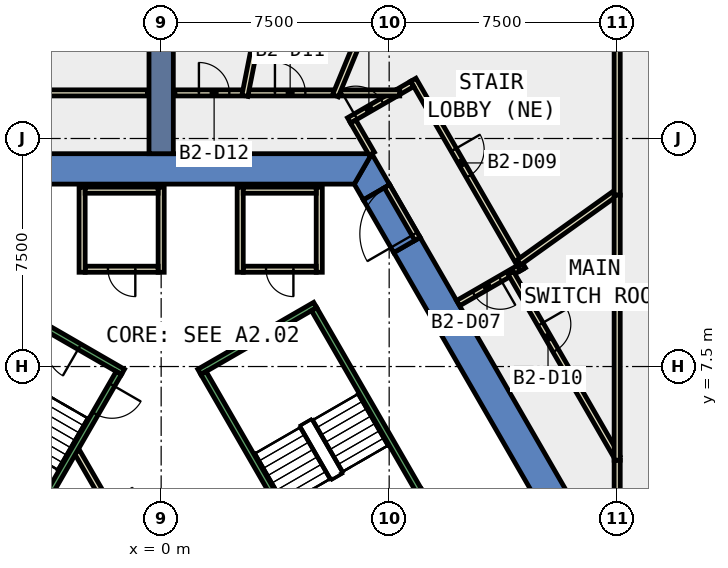
"""IFC4 building model, lengths in metres.
Left out: names, types, materials, properties, quantities, classifications, styles, units other than length and angle.
Written with IfcOpenShell. Run it as: python <this file> out.ifc"""

import sys

from ifc_helpers import new_model, si_unit, direction, frame, frame_2d, origin, place, context, subcontext, project, spatial, polyline, rectangle, outline, extrude, element, fill, save


model = new_model("IFC4")
c1 = context("Model", 3, precision=1e-05, world=origin(), true_north=direction((0.0, 1.0)))
c2 = subcontext(c1, "Body", "Model", "MODEL_VIEW")
j1 = project(units=[si_unit("LENGTHUNIT", "METRE"), si_unit("PLANEANGLEUNIT", "RADIAN")], contexts=[c1])
p1 = place(None, origin())
s1 = spatial("IfcSite", under=j1, at=p1, CompositionType="ELEMENT")
p2 = place(p1, origin())
s2 = spatial("IfcBuilding", under=s1, at=p2, CompositionType="ELEMENT")
p3 = place(p2, frame((0.0, 0.0, -11.0)))
s3 = spatial("IfcBuildingStorey", under=s2, at=p3, CompositionType="ELEMENT", Elevation=-11.0)
p4 = place(p3, frame((0.0, 0.0, -0.42)))
e1 = element("IfcWall", 1, at=p4, inside=s3, PredefinedType="SHEAR", context=c2, shape_type="SweptSolid", body=[
    extrude(outline(polyline([(8.517, 11.748), (7.651, 11.248), (12.702, 2.5), (13.856, 2.5), (8.517, 11.748)])), origin(), (0.0, 0.0, 1.0), 5.5),
])
p5 = place(p3, frame((0.0, 0.0, -0.42)))
e2 = element("IfcWall", 2, at=p5, inside=s3, PredefinedType="SHEAR", context=c2, shape_type="SweptSolid", body=[
    extrude(outline(polyline([(6.651, 12.98), (7.517, 13.48), (6.928, 14.5), (6.351, 13.5), (6.651, 12.98)])), origin(), (0.0, 0.0, 1.0), 5.5),
])
p6 = place(p3, frame((0.0, 0.0, 3.6)))
e3 = element("IfcWall", 3, at=p6, inside=s3, PredefinedType="SHEAR", context=c2, shape_type="SweptSolid", body=[
    extrude(outline(polyline([(7.517, 13.48), (6.651, 12.98), (7.651, 11.248), (8.517, 11.748), (7.517, 13.48)])), origin(), (0.0, 0.0, 1.0), 1.48),
])
p7 = place(p3, frame((0.0, 0.0, -0.42)))
e4 = element("IfcWall", 4, at=p7, inside=s3, PredefinedType="SHEAR", context=c2, shape_type="SweptSolid", body=[
    extrude(outline(polyline([(6.928, 14.5), (-6.928, 14.5), (-6.351, 13.5), (6.351, 13.5), (6.928, 14.5)])), origin(), (0.0, 0.0, 1.0), 5.5),
])
p8 = place(p3, frame((0.0, 14.5, -0.42), z_axis=(0.0, 0.0, 1.0), x_axis=(0.0, 1.0, 0.0)))
e5 = element("IfcWall", 5, at=p8, inside=s3, PredefinedType="SHEAR", context=c2, shape_type="SweptSolid", body=[
    extrude(rectangle(XDim=9.0, YDim=0.8, at=frame_2d((4.5, 0.0))), origin(), (0.0, 0.0, 1.0), 5.5),
])
p9 = place(p3, frame((11.845, 10.783, 0.0), z_axis=(0.0, 0.0, 1.0), x_axis=(-0.865973769406, -0.500089422704, 0.0)))
e6 = element("IfcWall", 6, at=p9, inside=s3, PredefinedType="PARTITIONING", context=c2, shape_type="SweptSolid", body=[
    extrude(rectangle(XDim=2.399, YDim=0.2, at=frame_2d((1.2, 0.0))), origin(), (0.0, 0.0, 1.0), 5.05),
])
p10 = place(p9, frame((0.8, 0.0, 0.0)))
e7 = element("IfcOpeningElement", 7, at=p10, cuts=e6, PredefinedType="OPENING", context=c2, shape_type="SweptSolid", body=[
    extrude(rectangle(XDim=1.0, YDim=2.1, at=frame_2d((0.5, 1.05))), frame((0.0, 0.11, 0.0), z_axis=(0.0, -1.0, 0.0), x_axis=(1.0, 0.0, 0.0)), (0.0, 0.0, 1.0), 0.22),
])
p11 = place(p3, frame((6.18, 15.595, 0.0), z_axis=(0.0, 0.0, 1.0), x_axis=(0.866102512622, 0.499866419787, 0.0)))
e8 = element("IfcWall", 8, at=p11, inside=s3, PredefinedType="PARTITIONING", context=c2, shape_type="SweptSolid", body=[
    extrude(rectangle(XDim=1.811, YDim=0.2, at=frame_2d((0.905, 0.0))), origin(), (0.0, 0.0, 1.0), 5.05),
])
p12 = place(p11, frame((0.254, 0.0, 0.0)))
e9 = element("IfcOpeningElement", 9, at=p12, cuts=e8, PredefinedType="OPENING", context=c2, shape_type="SweptSolid", body=[
    extrude(rectangle(XDim=1.0, YDim=2.1, at=frame_2d((0.5, 1.05))), frame((0.0, 0.11, 0.0), z_axis=(0.0, -1.0, 0.0), x_axis=(1.0, 0.0, 0.0)), (0.0, 0.0, 1.0), 0.22),
])
p13 = place(p3, frame((6.317, 15.558, 0.0), z_axis=(0.0, 0.0, 1.0), x_axis=(0.500114474492, -0.865959301817, 0.0)))
e10 = element("IfcWall", 10, at=p13, inside=s3, PredefinedType="PARTITIONING", context=c2, shape_type="SweptSolid", body=[
    extrude(rectangle(XDim=1.222, YDim=0.2, at=frame_2d((0.611, 0.0))), origin(), (0.0, 0.0, 1.0), 5.05),
])
p14 = place(p3, frame((8.295, 16.932, 0.0), z_axis=(0.0, 0.0, 1.0), x_axis=(0.499982693035, -0.866035395735, 0.0)))
e11 = element("IfcWall", 11, at=p14, inside=s3, PredefinedType="PARTITIONING", context=c2, shape_type="SweptSolid", body=[
    extrude(rectangle(XDim=7.2, YDim=0.2, at=frame_2d((3.6, 0.0))), origin(), (0.0, 0.0, 1.0), 5.05),
])
p15 = place(p14, frame((2.659, 0.0, 0.0)))
e12 = element("IfcOpeningElement", 12, at=p15, cuts=e11, PredefinedType="OPENING", context=c2, shape_type="SweptSolid", body=[
    extrude(rectangle(XDim=1.0, YDim=2.1, at=frame_2d((0.5, 1.05))), frame((0.0, 0.11, 0.0), z_axis=(0.0, -1.0, 0.0), x_axis=(1.0, 0.0, 0.0)), (0.0, 0.0, 1.0), 0.22),
])
p16 = place(p3, frame((7.748, 16.5, 0.0), z_axis=(0.0, 0.0, 1.0), x_axis=(0.865681519127, 0.500595153234, 0.0)))
e13 = element("IfcWall", 13, at=p16, inside=s3, PredefinedType="PARTITIONING", context=c2, shape_type="SweptSolid", body=[
    extrude(rectangle(XDim=0.589, YDim=0.2, at=frame_2d((0.294, 0.0))), origin(), (0.0, 0.0, 1.0), 5.05),
])
p17 = place(p3, frame((11.499, 10.583, 0.0), z_axis=(0.0, 0.0, 1.0), x_axis=(0.499994090379, -0.866028815679, 0.0)))
e14 = element("IfcWall", 14, at=p17, inside=s3, PredefinedType="PARTITIONING", context=c2, shape_type="SweptSolid", body=[
    extrude(rectangle(XDim=7.002, YDim=0.2, at=frame_2d((3.501, 0.0))), origin(), (0.0, 0.0, 1.0), 5.05),
])
p18 = place(p17, frame((1.952, 0.0, 0.0)))
e15 = element("IfcOpeningElement", 15, at=p18, cuts=e14, PredefinedType="OPENING", context=c2, shape_type="SweptSolid", body=[
    extrude(rectangle(XDim=1.0, YDim=2.1, at=frame_2d((0.5, 1.05))), frame((0.0, 0.11, 0.0), z_axis=(0.0, -1.0, 0.0), x_axis=(1.0, 0.0, 0.0)), (0.0, 0.0, 1.0), 0.22),
])
p19 = place(p3, frame((15.0, 4.419, 0.0), z_axis=(0.0, 0.0, 1.0), x_axis=(0.0, -1.0, 0.0)))
e16 = element("IfcWall", 16, at=p19, inside=s3, PredefinedType="PARTITIONING", context=c2, shape_type="SweptSolid", body=[
    extrude(rectangle(XDim=3.838, YDim=0.2, at=frame_2d((1.919, 0.0))), origin(), (0.0, 0.0, 1.0), 5.05),
])
p20 = place(p3, frame((5.871, 16.5, 0.0), z_axis=(0.0, 0.0, 1.0), x_axis=(1.0, 0.0, 0.0)))
e17 = element("IfcWall", 17, at=p20, inside=s3, PredefinedType="PARTITIONING", context=c2, shape_type="SweptSolid", body=[
    extrude(rectangle(XDim=1.977, YDim=0.2, at=frame_2d((0.988, 0.0))), origin(), (0.0, 0.0, 1.0), 5.05),
])
p21 = place(p3, frame((2.872, 16.5, 0.0), z_axis=(0.0, 0.0, 1.0), x_axis=(1.0, 0.0, 0.0)))
e18 = element("IfcWall", 18, at=p21, inside=s3, PredefinedType="PARTITIONING", context=c2, shape_type="SweptSolid", body=[
    extrude(rectangle(XDim=2.799, YDim=0.2, at=frame_2d((1.399, 0.0))), origin(), (0.0, 0.0, 1.0), 5.05),
])
p22 = place(p21, frame((0.871, 0.0, 0.0)))
e19 = element("IfcOpeningElement", 19, at=p22, cuts=e18, PredefinedType="OPENING", context=c2, shape_type="SweptSolid", body=[
    extrude(rectangle(XDim=1.0, YDim=2.1, at=frame_2d((0.5, 1.05))), frame((0.0, 0.11, 0.0), z_axis=(0.0, -1.0, 0.0), x_axis=(1.0, 0.0, 0.0)), (0.0, 0.0, 1.0), 0.22),
])
p23 = place(p3, frame((0.45, 16.5, 0.0), z_axis=(0.0, 0.0, 1.0), x_axis=(1.0, 0.0, 0.0)))
e20 = element("IfcWall", 20, at=p23, inside=s3, PredefinedType="PARTITIONING", context=c2, shape_type="SweptSolid", body=[
    extrude(rectangle(XDim=2.222, YDim=0.2, at=frame_2d((1.111, 0.0))), origin(), (0.0, 0.0, 1.0), 5.05),
])
p24 = place(p23, frame((0.792, 0.0, 0.0)))
e21 = element("IfcOpeningElement", 21, at=p24, cuts=e20, PredefinedType="OPENING", context=c2, shape_type="SweptSolid", body=[
    extrude(rectangle(XDim=1.0, YDim=2.1, at=frame_2d((0.5, 1.05))), frame((0.0, 0.11, 0.0), z_axis=(0.0, -1.0, 0.0), x_axis=(1.0, 0.0, 0.0)), (0.0, 0.0, 1.0), 0.22),
])
p25 = place(p3, frame((14.919, 13.18, 0.0), z_axis=(0.0, 0.0, 1.0), x_axis=(-0.81313339858, -0.582077379833, 0.0)))
e22 = element("IfcWall", 22, at=p25, inside=s3, PredefinedType="PARTITIONING", context=c2, shape_type="SweptSolid", body=[
    extrude(rectangle(XDim=3.879, YDim=0.2, at=frame_2d((1.939, 0.0))), origin(), (0.0, 0.0, 1.0), 5.05),
])
p26 = place(p3, frame((5.733, 16.408, 0.0), z_axis=(0.0, 0.0, 1.0), x_axis=(0.381113406353, 0.924528296754, 0.0)))
e23 = element("IfcWall", 23, at=p26, inside=s3, PredefinedType="PARTITIONING", context=c2, shape_type="SweptSolid", body=[
    extrude(rectangle(XDim=17.83, YDim=0.2, at=frame_2d((8.915, 0.0))), origin(), (0.0, 0.0, 1.0), 5.05),
])
p27 = place(p3, frame((15.0, 32.9, 0.0), z_axis=(0.0, 0.0, 1.0), x_axis=(0.0, -1.0, 0.0)))
e24 = element("IfcWall", 24, at=p27, inside=s3, PredefinedType="PARTITIONING", context=c2, shape_type="SweptSolid", body=[
    extrude(rectangle(XDim=19.762, YDim=0.2, at=frame_2d((9.881, 0.0))), origin(), (0.0, 0.0, 1.0), 5.05),
])
p28 = place(p27, frame((6.168, 0.0, 0.0)))
e25 = element("IfcOpeningElement", 25, at=p28, cuts=e24, PredefinedType="OPENING", context=c2, shape_type="SweptSolid", body=[
    extrude(rectangle(XDim=1.8, YDim=2.1, at=frame_2d((0.9, 1.05))), frame((0.0, 0.11, 0.0), z_axis=(0.0, -1.0, 0.0), x_axis=(1.0, 0.0, 0.0)), (0.0, 0.0, 1.0), 0.22),
])
p29 = place(p3, frame((15.0, 13.138, 0.0), z_axis=(0.0, 0.0, 1.0), x_axis=(0.0, -1.0, 0.0)))
e26 = element("IfcWall", 26, at=p29, inside=s3, PredefinedType="PARTITIONING", context=c2, shape_type="SweptSolid", body=[
    extrude(rectangle(XDim=8.719, YDim=0.2, at=frame_2d((4.359, 0.0))), origin(), (0.0, 0.0, 1.0), 5.05),
])
p30 = place(p3, frame((2.753, 16.402, 0.0), z_axis=(0.0, 0.0, 1.0), x_axis=(0.194225601905, 0.98095688772, 0.0)))
e27 = element("IfcWall", 27, at=p30, inside=s3, PredefinedType="PARTITIONING", context=c2, shape_type="SweptSolid", body=[
    extrude(rectangle(XDim=16.816, YDim=0.2, at=frame_2d((8.408, 0.0))), origin(), (0.0, 0.0, 1.0), 5.05),
])
p31 = place(p3, frame((-7.983, 16.5, 0.0), z_axis=(0.0, 0.0, 1.0), x_axis=(1.0, 0.0, 0.0)))
e28 = element("IfcWall", 28, at=p31, inside=s3, PredefinedType="PARTITIONING", context=c2, shape_type="SweptSolid", body=[
    extrude(rectangle(XDim=7.533, YDim=0.2, at=frame_2d((3.767, 0.0))), origin(), (0.0, 0.0, 1.0), 5.05),
])
p32 = place(p3, frame((5.2, 13.4, 0.0), z_axis=(0.0, 0.0, 1.0), x_axis=(0.0, -1.0, 0.0)))
e29 = element("IfcWall", 29, at=p32, inside=s3, PredefinedType="PARTITIONING", context=c2, shape_type="SweptSolid", body=[
    extrude(rectangle(XDim=2.8, YDim=0.2, at=frame_2d((1.4, 0.0))), origin(), (0.0, 0.0, 1.0), 5.05),
])
p33 = place(p3, frame((5.1, 10.7, 0.0), z_axis=(0.0, 0.0, 1.0), x_axis=(-1.0, 0.0, 0.0)))
e30 = element("IfcWall", 30, at=p33, inside=s3, PredefinedType="PARTITIONING", context=c2, shape_type="SweptSolid", body=[
    extrude(rectangle(XDim=2.4, YDim=0.2, at=frame_2d((1.2, 0.0))), origin(), (0.0, 0.0, 1.0), 5.05),
])
p34 = place(p33, frame((0.75, 0.0, 0.0)))
e31 = element("IfcOpeningElement", 31, at=p34, cuts=e30, PredefinedType="OPENING", context=c2, shape_type="SweptSolid", body=[
    extrude(rectangle(XDim=0.9, YDim=2.1, at=frame_2d((0.45, 1.05))), frame((0.0, 0.11, 0.0), z_axis=(0.0, -1.0, 0.0), x_axis=(1.0, 0.0, 0.0)), (0.0, 0.0, 1.0), 0.22),
])
p35 = place(p3, frame((2.6, 10.6, 0.0), z_axis=(0.0, 0.0, 1.0), x_axis=(0.0, 1.0, 0.0)))
e32 = element("IfcWall", 32, at=p35, inside=s3, PredefinedType="PARTITIONING", context=c2, shape_type="SweptSolid", body=[
    extrude(rectangle(XDim=2.8, YDim=0.2, at=frame_2d((1.4, 0.0))), origin(), (0.0, 0.0, 1.0), 5.05),
])
p36 = place(p3, frame((2.7, 13.3, 0.0), z_axis=(0.0, 0.0, 1.0), x_axis=(1.0, 0.0, 0.0)))
e33 = element("IfcWall", 33, at=p36, inside=s3, PredefinedType="PARTITIONING", context=c2, shape_type="SweptSolid", body=[
    extrude(rectangle(XDim=2.4, YDim=0.2, at=frame_2d((1.2, 0.0))), origin(), (0.0, 0.0, 1.0), 5.05),
])
p37 = place(p3, frame((0.0, 13.4, 0.0), z_axis=(0.0, 0.0, 1.0), x_axis=(0.0, -1.0, 0.0)))
e34 = element("IfcWall", 34, at=p37, inside=s3, PredefinedType="PARTITIONING", context=c2, shape_type="SweptSolid", body=[
    extrude(rectangle(XDim=2.8, YDim=0.2, at=frame_2d((1.4, 0.0))), origin(), (0.0, 0.0, 1.0), 5.05),
])
p38 = place(p3, frame((-0.1, 10.7, 0.0), z_axis=(0.0, 0.0, 1.0), x_axis=(-1.0, 0.0, 0.0)))
e35 = element("IfcWall", 35, at=p38, inside=s3, PredefinedType="PARTITIONING", context=c2, shape_type="SweptSolid", body=[
    extrude(rectangle(XDim=2.4, YDim=0.2, at=frame_2d((1.2, 0.0))), origin(), (0.0, 0.0, 1.0), 5.05),
])
p39 = place(p38, frame((0.75, 0.0, 0.0)))
e36 = element("IfcOpeningElement", 36, at=p39, cuts=e35, PredefinedType="OPENING", context=c2, shape_type="SweptSolid", body=[
    extrude(rectangle(XDim=0.9, YDim=2.1, at=frame_2d((0.45, 1.05))), frame((0.0, 0.11, 0.0), z_axis=(0.0, -1.0, 0.0), x_axis=(1.0, 0.0, 0.0)), (0.0, 0.0, 1.0), 0.22),
])
p40 = place(p3, frame((-2.6, 10.6, 0.0), z_axis=(0.0, 0.0, 1.0), x_axis=(0.0, 1.0, 0.0)))
e37 = element("IfcWall", 37, at=p40, inside=s3, PredefinedType="PARTITIONING", context=c2, shape_type="SweptSolid", body=[
    extrude(rectangle(XDim=2.8, YDim=0.2, at=frame_2d((1.4, 0.0))), origin(), (0.0, 0.0, 1.0), 5.05),
])
p41 = place(p3, frame((-2.5, 13.3, 0.0), z_axis=(0.0, 0.0, 1.0), x_axis=(1.0, 0.0, 0.0)))
e38 = element("IfcWall", 38, at=p41, inside=s3, PredefinedType="PARTITIONING", context=c2, shape_type="SweptSolid", body=[
    extrude(rectangle(XDim=2.4, YDim=0.2, at=frame_2d((1.2, 0.0))), origin(), (0.0, 0.0, 1.0), 5.05),
])
p42 = place(p3, frame((-2.771, 4.7, 0.0), z_axis=(0.0, 0.0, 1.0), x_axis=(0.499969479948, -0.866043023828, 0.0)))
e39 = element("IfcWall", 39, at=p42, inside=s3, PredefinedType="PARTITIONING", context=c2, shape_type="SweptSolid", body=[
    extrude(rectangle(XDim=4.99, YDim=0.2, at=frame_2d((2.495, 0.0))), origin(), (0.0, 0.0, 1.0), 5.05),
])
p43 = place(p42, frame((1.945, 0.0, 0.0)))
e40 = element("IfcOpeningElement", 40, at=p43, cuts=e39, PredefinedType="OPENING", context=c2, shape_type="SweptSolid", body=[
    extrude(rectangle(XDim=1.0, YDim=2.1, at=frame_2d((0.5, 1.05))), frame((0.0, 0.11, 0.0), z_axis=(0.0, -1.0, 0.0), x_axis=(1.0, 0.0, 0.0)), (0.0, 0.0, 1.0), 0.22),
])
p44 = place(p3, frame((8.43, 11.698, 0.0), z_axis=(0.0, 0.0, 1.0), x_axis=(-0.50002537861, 0.866010750942, 0.0)))
e41 = element("IfcWall", 41, at=p44, inside=s3, PredefinedType="PARTITIONING", context=c2, shape_type="SweptSolid", body=[
    extrude(rectangle(XDim=2.0, YDim=0.2, at=frame_2d((1.0, 0.0))), origin(), (0.0, 0.0, 1.0), 2.4),
])
p45 = place(p44, frame((0.19, 0.0, 0.0)))
e42 = element("IfcOpeningElement", 42, at=p45, cuts=e41, PredefinedType="OPENING", context=c2, shape_type="SweptSolid", body=[
    extrude(rectangle(XDim=1.8, YDim=2.1, at=frame_2d((0.9, 1.05))), frame((0.0, 0.11, 0.0), z_axis=(0.0, -1.0, 0.0), x_axis=(1.0, 0.0, 0.0)), (0.0, 0.0, 1.0), 0.22),
])
p46 = place(p3, frame((1.256, 7.324, 0.0), z_axis=(0.0, 0.0, 1.0), x_axis=(0.866046073146, 0.499964197906, 0.0)))
e43 = element("IfcWall", 43, at=p46, inside=s3, PredefinedType="STANDARD", context=c2, shape_type="SweptSolid", body=[
    extrude(rectangle(XDim=4.4, YDim=0.2, at=frame_2d((2.2, 0.0))), origin(), (0.0, 0.0, 1.0), 5.05),
])
p47 = place(p3, frame((4.843, 1.312, 0.0), z_axis=(0.0, 0.0, 1.0), x_axis=(-0.499963383562, 0.866046543262, 0.0)))
e44 = element("IfcWall", 44, at=p47, inside=s3, PredefinedType="STANDARD", context=c2, shape_type="SweptSolid", body=[
    extrude(rectangle(XDim=6.9, YDim=0.2, at=frame_2d((3.45, 0.0))), origin(), (0.0, 0.0, 1.0), 5.05),
])
p48 = place(p47, frame((0.45, 0.0, 0.0)))
e45 = element("IfcOpeningElement", 45, at=p48, cuts=e44, PredefinedType="OPENING", context=c2, shape_type="SweptSolid", body=[
    extrude(rectangle(XDim=1.1, YDim=2.2, at=frame_2d((0.55, 1.1))), frame((0.0, 0.11, 0.0), z_axis=(0.0, -1.0, 0.0), x_axis=(1.0, 0.0, 0.0)), (0.0, 0.0, 1.0), 0.22),
])
p49 = place(p3, frame((8.48, 3.412, 0.0), z_axis=(0.0, 0.0, 1.0), x_axis=(-0.499978703459, 0.866037698999, 0.0)))
e46 = element("IfcWall", 46, at=p49, inside=s3, PredefinedType="STANDARD", context=c2, shape_type="SweptSolid", body=[
    extrude(rectangle(XDim=6.9, YDim=0.2, at=frame_2d((3.45, 0.0))), origin(), (0.0, 0.0, 1.0), 5.05),
])
p50 = place(p3, frame((-1.256, 7.324, 0.0), z_axis=(0.0, 0.0, 1.0), x_axis=(-0.866046073146, 0.499964197906, 0.0)))
e47 = element("IfcWall", 47, at=p50, inside=s3, PredefinedType="STANDARD", context=c2, shape_type="SweptSolid", body=[
    extrude(rectangle(XDim=4.4, YDim=0.2, at=frame_2d((2.2, 0.0))), origin(), (0.0, 0.0, 1.0), 5.05),
])
p51 = place(p50, frame((1.65, 0.0, 0.0)))
e48 = element("IfcOpeningElement", 48, at=p51, cuts=e47, PredefinedType="OPENING", context=c2, shape_type="SweptSolid", body=[
    extrude(rectangle(XDim=1.1, YDim=2.2, at=frame_2d((0.55, 1.1))), frame((0.0, 0.11, 0.0), z_axis=(0.0, -1.0, 0.0), x_axis=(1.0, 0.0, 0.0)), (0.0, 0.0, 1.0), 0.22),
])
p52 = place(p3, frame((-1.393, 7.288, 0.0), z_axis=(0.0, 0.0, 1.0), x_axis=(-0.499963383562, -0.866046543262, 0.0)))
e49 = element("IfcWall", 49, at=p52, inside=s3, PredefinedType="STANDARD", context=c2, shape_type="SweptSolid", body=[
    extrude(rectangle(XDim=6.9, YDim=0.2, at=frame_2d((3.45, 0.0))), origin(), (0.0, 0.0, 1.0), 5.05),
])
p53 = place(p52, frame((0.45, 0.0, 0.0)))
e50 = element("IfcOpeningElement", 50, at=p53, cuts=e49, PredefinedType="OPENING", context=c2, shape_type="SweptSolid", body=[
    extrude(rectangle(XDim=1.1, YDim=2.2, at=frame_2d((0.55, 1.1))), frame((0.0, 0.11, 0.0), z_axis=(0.0, -1.0, 0.0), x_axis=(1.0, 0.0, 0.0)), (0.0, 0.0, 1.0), 0.22),
])
p54 = place(p10, origin())
e51 = element("IfcDoor", 51, at=p54, inside=s3, OperationType="SINGLE_SWING_LEFT", PredefinedType="DOOR", context=c2, shape_type="SweptSolid", body=[
    extrude(rectangle(XDim=1.0, YDim=2.1, at=frame_2d((0.5, 1.05))), frame((0.0, 0.025, 0.0), z_axis=(0.0, -1.0, 0.0), x_axis=(1.0, 0.0, 0.0)), (0.0, 0.0, 1.0), 0.05),
])
fill(e7, e51)
p55 = place(p12, origin())
e52 = element("IfcDoor", 52, at=p55, inside=s3, OperationType="SINGLE_SWING_RIGHT", PredefinedType="DOOR", context=c2, shape_type="SweptSolid", body=[
    extrude(rectangle(XDim=1.0, YDim=2.1, at=frame_2d((0.5, 1.05))), frame((0.0, 0.025, 0.0), z_axis=(0.0, -1.0, 0.0), x_axis=(1.0, 0.0, 0.0)), (0.0, 0.0, 1.0), 0.05),
])
fill(e9, e52)
p56 = place(p15, origin())
e53 = element("IfcDoor", 53, at=p56, inside=s3, OperationType="SINGLE_SWING_LEFT", PredefinedType="DOOR", context=c2, shape_type="SweptSolid", body=[
    extrude(rectangle(XDim=1.0, YDim=2.1, at=frame_2d((0.5, 1.05))), frame((0.0, 0.025, 0.0), z_axis=(0.0, -1.0, 0.0), x_axis=(1.0, 0.0, 0.0)), (0.0, 0.0, 1.0), 0.05),
])
fill(e12, e53)
p57 = place(p18, origin())
e54 = element("IfcDoor", 54, at=p57, inside=s3, OperationType="SINGLE_SWING_RIGHT", PredefinedType="DOOR", context=c2, shape_type="SweptSolid", body=[
    extrude(rectangle(XDim=1.0, YDim=2.1, at=frame_2d((0.5, 1.05))), frame((0.0, 0.025, 0.0), z_axis=(0.0, -1.0, 0.0), x_axis=(1.0, 0.0, 0.0)), (0.0, 0.0, 1.0), 0.05),
])
fill(e15, e54)
p58 = place(p22, origin())
e55 = element("IfcDoor", 55, at=p58, inside=s3, OperationType="SINGLE_SWING_LEFT", PredefinedType="DOOR", context=c2, shape_type="SweptSolid", body=[
    extrude(rectangle(XDim=1.0, YDim=2.1, at=frame_2d((0.5, 1.05))), frame((0.0, 0.025, 0.0), z_axis=(0.0, -1.0, 0.0), x_axis=(1.0, 0.0, 0.0)), (0.0, 0.0, 1.0), 0.05),
])
fill(e19, e55)
p59 = place(p24, origin())
e56 = element("IfcDoor", 56, at=p59, inside=s3, OperationType="SINGLE_SWING_RIGHT", PredefinedType="DOOR", context=c2, shape_type="SweptSolid", body=[
    extrude(rectangle(XDim=1.0, YDim=2.1, at=frame_2d((0.5, 1.05))), frame((0.0, 0.025, 0.0), z_axis=(0.0, -1.0, 0.0), x_axis=(1.0, 0.0, 0.0)), (0.0, 0.0, 1.0), 0.05),
])
fill(e21, e56)
p60 = place(p34, origin())
e57 = element("IfcDoor", 57, at=p60, inside=s3, OperationType="SINGLE_SWING_RIGHT", PredefinedType="DOOR", context=c2, shape_type="SweptSolid", body=[
    extrude(rectangle(XDim=0.9, YDim=2.1, at=frame_2d((0.45, 1.05))), frame((0.0, 0.025, 0.0), z_axis=(0.0, -1.0, 0.0), x_axis=(1.0, 0.0, 0.0)), (0.0, 0.0, 1.0), 0.05),
])
fill(e31, e57)
p61 = place(p39, origin())
e58 = element("IfcDoor", 58, at=p61, inside=s3, OperationType="SINGLE_SWING_RIGHT", PredefinedType="DOOR", context=c2, shape_type="SweptSolid", body=[
    extrude(rectangle(XDim=0.9, YDim=2.1, at=frame_2d((0.45, 1.05))), frame((0.0, 0.025, 0.0), z_axis=(0.0, -1.0, 0.0), x_axis=(1.0, 0.0, 0.0)), (0.0, 0.0, 1.0), 0.05),
])
fill(e36, e58)
p62 = place(p45, origin())
e59 = element("IfcDoor", 59, at=p62, inside=s3, OperationType="DOUBLE_DOOR_SINGLE_SWING", PredefinedType="DOOR", context=c2, shape_type="SweptSolid", body=[
    extrude(rectangle(XDim=1.8, YDim=2.1, at=frame_2d((0.9, 1.05))), frame((0.0, 0.025, 0.0), z_axis=(0.0, -1.0, 0.0), x_axis=(1.0, 0.0, 0.0)), (0.0, 0.0, 1.0), 0.05),
])
fill(e42, e59)
p63 = place(p53, origin())
e60 = element("IfcDoor", 60, at=p63, inside=s3, OperationType="SINGLE_SWING_LEFT", PredefinedType="DOOR", context=c2, shape_type="SweptSolid", body=[
    extrude(rectangle(XDim=1.1, YDim=2.2, at=frame_2d((0.55, 1.1))), frame((0.0, 0.025, 0.0), z_axis=(0.0, -1.0, 0.0), x_axis=(1.0, 0.0, 0.0)), (0.0, 0.0, 1.0), 0.05),
])
fill(e50, e60)
p64 = place(p51, origin())
e61 = element("IfcDoor", 61, at=p64, inside=s3, OperationType="SINGLE_SWING_LEFT", PredefinedType="DOOR", context=c2, shape_type="SweptSolid", body=[
    extrude(rectangle(XDim=1.1, YDim=2.2, at=frame_2d((0.55, 1.1))), frame((0.0, 0.025, 0.0), z_axis=(0.0, -1.0, 0.0), x_axis=(1.0, 0.0, 0.0)), (0.0, 0.0, 1.0), 0.05),
])
fill(e48, e61)
save(model, sys.argv[1])
